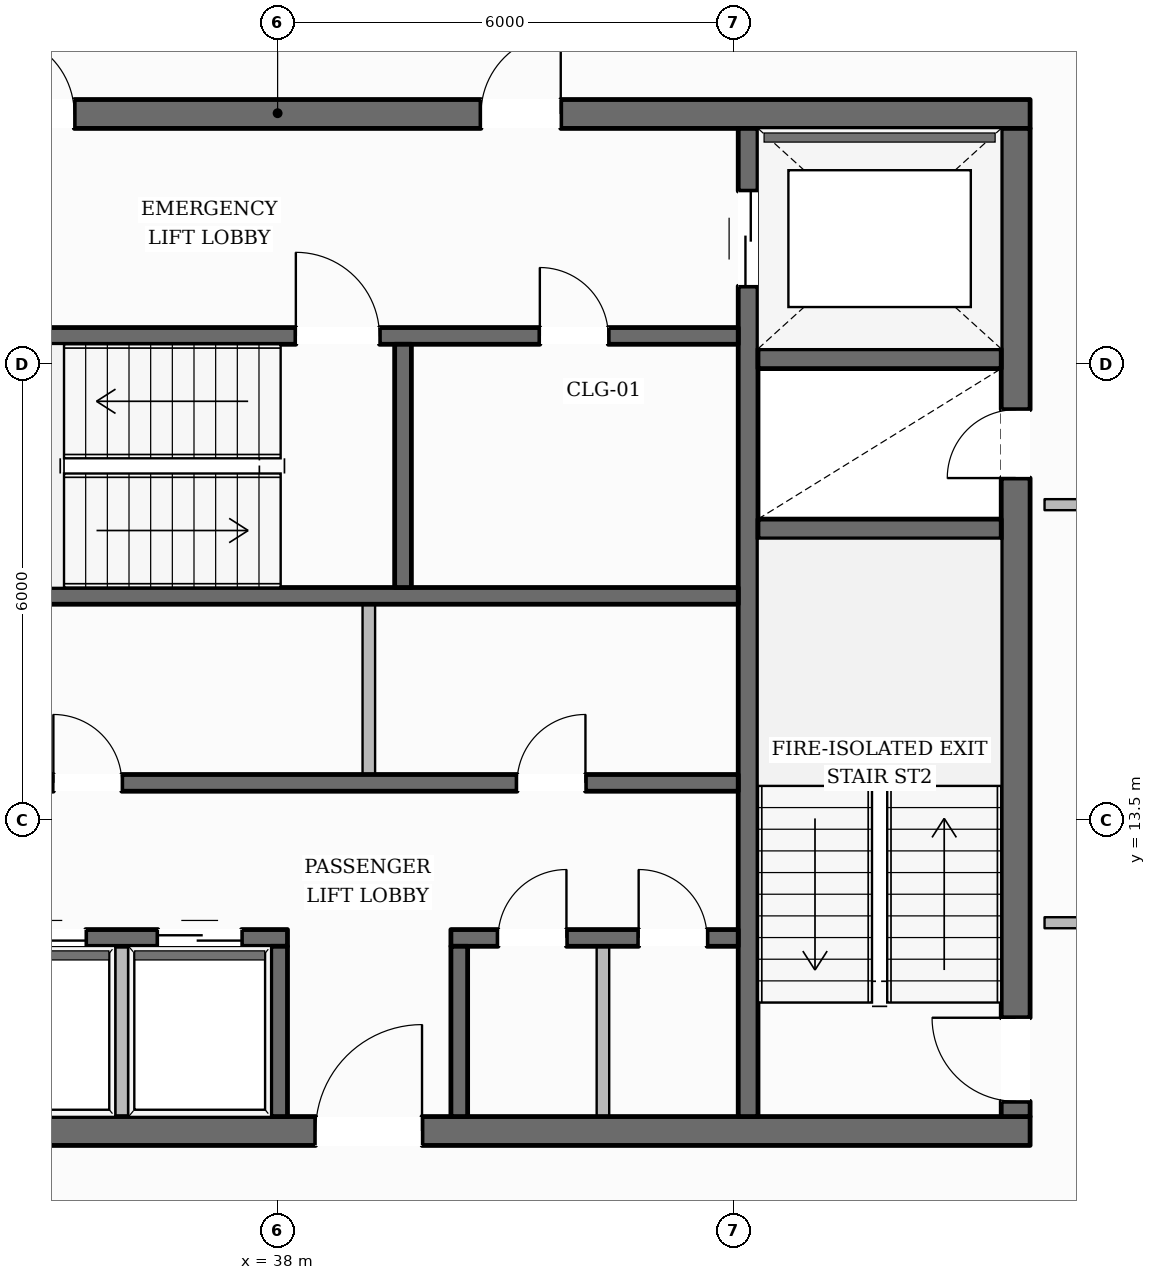
"""IFC4 building model, lengths in metres.
Left out: names, types, materials, properties, quantities, classifications, styles, units other than length and angle.
Written with IfcOpenShell. Run it as: python <this file> out.ifc"""

import sys

from ifc_helpers import new_model, si_unit, direction, frame, frame_2d, origin, place, context, subcontext, project, spatial, rectangle, extrude, element, fill, save


model = new_model("IFC4")
c1 = context("Model", 3, precision=1e-05, world=origin(), true_north=direction((0.0, 1.0)))
c2 = subcontext(c1, "Body", "Model", "MODEL_VIEW")
j1 = project(units=[si_unit("LENGTHUNIT", "METRE"), si_unit("PLANEANGLEUNIT", "RADIAN")], contexts=[c1])
p1 = place(None, origin())
s1 = spatial("IfcSite", under=j1, at=p1, CompositionType="ELEMENT")
p2 = place(p1, origin())
s2 = spatial("IfcBuilding", under=s1, at=p2, CompositionType="ELEMENT")
p3 = place(p2, frame((0.0, 0.0, 258.75)))
s3 = spatial("IfcBuildingStorey", under=s2, at=p3, CompositionType="ELEMENT", Elevation=258.75)
p4 = place(p3, frame((28.1, 9.41, 0.0), z_axis=(0.0, 0.0, 1.0), x_axis=(1.0, 0.0, 0.0)))
e1 = element("IfcWall", 1, at=p4, inside=s3, PredefinedType="SOLIDWALL", context=c2, shape_type="SweptSolid", body=[
    extrude(rectangle(XDim=19.8, YDim=0.38, at=frame_2d((9.9, 0.0))), origin(), (0.0, 0.0, 1.0), 3.61),
])
p5 = place(p4, frame((10.4, 0.0, 0.0)))
e2 = element("IfcOpeningElement", 2, at=p5, cuts=e1, PredefinedType="OPENING", context=c2, shape_type="SweptSolid", body=[
    extrude(rectangle(XDim=1.4, YDim=2.2, at=frame_2d((0.7, 1.1))), frame((0.0, 0.2, 0.0), z_axis=(0.0, -1.0, 0.0), x_axis=(1.0, 0.0, 0.0)), (0.0, 0.0, 1.0), 0.4),
])
p6 = place(p3, frame((28.1, 22.79, 0.0), z_axis=(0.0, 0.0, 1.0), x_axis=(1.0, 0.0, 0.0)))
e3 = element("IfcWall", 3, at=p6, inside=s3, PredefinedType="SOLIDWALL", context=c2, shape_type="SweptSolid", body=[
    extrude(rectangle(XDim=19.8, YDim=0.38, at=frame_2d((9.9, 0.0))), origin(), (0.0, 0.0, 1.0), 3.61),
])
p7 = place(p6, frame((6.175, 0.0, 0.0)))
e4 = element("IfcOpeningElement", 4, at=p7, cuts=e3, PredefinedType="OPENING", context=c2, shape_type="SweptSolid", body=[
    extrude(rectangle(XDim=1.05, YDim=2.15, at=frame_2d((0.525, 1.075))), frame((0.0, 0.2, 0.0), z_axis=(0.0, -1.0, 0.0), x_axis=(1.0, 0.0, 0.0)), (0.0, 0.0, 1.0), 0.4),
])
p8 = place(p6, frame((12.575, 0.0, 0.0)))
e5 = element("IfcOpeningElement", 5, at=p8, cuts=e3, PredefinedType="OPENING", context=c2, shape_type="SweptSolid", body=[
    extrude(rectangle(XDim=1.05, YDim=2.15, at=frame_2d((0.525, 1.075))), frame((0.0, 0.2, 0.0), z_axis=(0.0, -1.0, 0.0), x_axis=(1.0, 0.0, 0.0)), (0.0, 0.0, 1.0), 0.4),
])
p9 = place(p3, frame((47.71, 9.6, 0.0), z_axis=(0.0, 0.0, 1.0), x_axis=(0.0, 1.0, 0.0)))
e6 = element("IfcWall", 6, at=p9, inside=s3, PredefinedType="SOLIDWALL", context=c2, shape_type="SweptSolid", body=[
    extrude(rectangle(XDim=13.0, YDim=0.38, at=frame_2d((6.5, 0.0))), origin(), (0.0, 0.0, 1.0), 3.61),
])
p10 = place(p9, frame((0.2, 0.0, 0.0)))
e7 = element("IfcOpeningElement", 7, at=p10, cuts=e6, PredefinedType="OPENING", context=c2, shape_type="SweptSolid", body=[
    extrude(rectangle(XDim=1.1, YDim=2.15, at=frame_2d((0.55, 1.075))), frame((0.0, 0.2, 0.0), z_axis=(0.0, -1.0, 0.0), x_axis=(1.0, 0.0, 0.0)), (0.0, 0.0, 1.0), 0.4),
])
p11 = place(p9, frame((8.4, 0.0, 0.0)))
e8 = element("IfcOpeningElement", 8, at=p11, cuts=e6, PredefinedType="OPENING", context=c2, shape_type="SweptSolid", body=[
    extrude(rectangle(XDim=0.9, YDim=2.1, at=frame_2d((0.45, 1.05))), frame((0.0, 0.2, 0.0), z_axis=(0.0, -1.0, 0.0), x_axis=(1.0, 0.0, 0.0)), (0.0, 0.0, 1.0), 0.4),
])
p12 = place(p3, frame((44.19, 9.6, 0.0), z_axis=(0.0, 0.0, 1.0), x_axis=(0.0, 1.0, 0.0)))
e9 = element("IfcWall", 9, at=p12, inside=s3, PredefinedType="SHEAR", context=c2, shape_type="SweptSolid", body=[
    extrude(rectangle(XDim=13.0, YDim=0.26, at=frame_2d((6.5, 0.0))), origin(), (0.0, 0.0, 1.0), 3.61),
])
p13 = place(p12, frame((10.925, 0.0, 0.0)))
e10 = element("IfcOpeningElement", 10, at=p13, cuts=e9, PredefinedType="OPENING", context=c2, shape_type="SweptSolid", body=[
    extrude(rectangle(XDim=1.25, YDim=2.25, at=frame_2d((0.625, 1.125))), frame((0.0, 0.14, 0.0), z_axis=(0.0, -1.0, 0.0), x_axis=(1.0, 0.0, 0.0)), (0.0, 0.0, 1.0), 0.28),
])
for number, where, z_axis, x_axis in (
    (11, (44.32, 17.33, 0.0), (0.0, 0.0, 1.0), (1.0, 0.0, 0.0)),
    (12, (44.32, 19.57, 0.0), (0.0, 0.0, 1.0), (1.0, 0.0, 0.0)),
):
    element("IfcWall", number, at=place(p3, frame(where, z_axis=z_axis, x_axis=x_axis)), inside=s3, PredefinedType="SHEAR", context=c2, shape_type="SweptSolid", body=[
        extrude(rectangle(XDim=3.2, YDim=0.26, at=frame_2d((1.6, 0.0))), origin(), (0.0, 0.0, 1.0), 3.61),
    ])
p14 = place(p3, frame((31.94, 19.87, 0.0), z_axis=(0.0, 0.0, 1.0), x_axis=(1.0, 0.0, 0.0)))
e13 = element("IfcWall", 13, at=p14, inside=s3, PredefinedType="SOLIDWALL", context=c2, shape_type="SweptSolid", body=[
    extrude(rectangle(XDim=12.12, YDim=0.22, at=frame_2d((6.06, 0.0))), origin(), (0.0, 0.0, 1.0), 3.61),
])
p15 = place(p14, frame((6.3, 0.0, 0.0)))
e14 = element("IfcOpeningElement", 14, at=p15, cuts=e13, PredefinedType="OPENING", context=c2, shape_type="SweptSolid", body=[
    extrude(rectangle(XDim=1.1, YDim=2.15, at=frame_2d((0.55, 1.075))), frame((0.0, 0.12, 0.0), z_axis=(0.0, -1.0, 0.0), x_axis=(1.0, 0.0, 0.0)), (0.0, 0.0, 1.0), 0.24),
])
p16 = place(p14, frame((9.51, 0.0, 0.0)))
e15 = element("IfcOpeningElement", 15, at=p16, cuts=e13, PredefinedType="OPENING", context=c2, shape_type="SweptSolid", body=[
    extrude(rectangle(XDim=0.9, YDim=2.1, at=frame_2d((0.45, 1.05))), frame((0.0, 0.12, 0.0), z_axis=(0.0, -1.0, 0.0), x_axis=(1.0, 0.0, 0.0)), (0.0, 0.0, 1.0), 0.24),
])
p17 = place(p3, frame((31.94, 16.45, 0.0), z_axis=(0.0, 0.0, 1.0), x_axis=(1.0, 0.0, 0.0)))
e16 = element("IfcWall", 16, at=p17, inside=s3, PredefinedType="SOLIDWALL", context=c2, shape_type="SweptSolid", body=[
    extrude(rectangle(XDim=12.12, YDim=0.22, at=frame_2d((6.06, 0.0))), origin(), (0.0, 0.0, 1.0), 3.61),
])
p18 = place(p3, frame((39.65, 16.56, 0.0), z_axis=(0.0, 0.0, 1.0), x_axis=(0.0, 1.0, 0.0)))
e17 = element("IfcWall", 17, at=p18, inside=s3, PredefinedType="SOLIDWALL", context=c2, shape_type="SweptSolid", body=[
    extrude(rectangle(XDim=3.2, YDim=0.22, at=frame_2d((1.6, 0.0))), origin(), (0.0, 0.0, 1.0), 3.61),
])
p19 = place(p3, frame((31.94, 13.99, 0.0), z_axis=(0.0, 0.0, 1.0), x_axis=(1.0, 0.0, 0.0)))
e18 = element("IfcWall", 18, at=p19, inside=s3, PredefinedType="SOLIDWALL", context=c2, shape_type="SweptSolid", body=[
    extrude(rectangle(XDim=12.12, YDim=0.22, at=frame_2d((6.06, 0.0))), origin(), (0.0, 0.0, 1.0), 3.61),
])
p20 = place(p19, frame((3.11, 0.0, 0.0)))
e19 = element("IfcOpeningElement", 19, at=p20, cuts=e18, PredefinedType="OPENING", context=c2, shape_type="SweptSolid", body=[
    extrude(rectangle(XDim=0.9, YDim=2.1, at=frame_2d((0.45, 1.05))), frame((0.0, 0.12, 0.0), z_axis=(0.0, -1.0, 0.0), x_axis=(1.0, 0.0, 0.0)), (0.0, 0.0, 1.0), 0.24),
])
p21 = place(p19, frame((9.21, 0.0, 0.0)))
e20 = element("IfcOpeningElement", 20, at=p21, cuts=e18, PredefinedType="OPENING", context=c2, shape_type="SweptSolid", body=[
    extrude(rectangle(XDim=0.9, YDim=2.1, at=frame_2d((0.45, 1.05))), frame((0.0, 0.12, 0.0), z_axis=(0.0, -1.0, 0.0), x_axis=(1.0, 0.0, 0.0)), (0.0, 0.0, 1.0), 0.24),
])
p22 = place(p3, frame((31.94, 11.95, 0.0), z_axis=(0.0, 0.0, 1.0), x_axis=(1.0, 0.0, 0.0)))
e21 = element("IfcWall", 21, at=p22, inside=s3, PredefinedType="SOLIDWALL", context=c2, shape_type="SweptSolid", body=[
    extrude(rectangle(XDim=6.19, YDim=0.22, at=frame_2d((3.095, 0.0))), origin(), (0.0, 0.0, 1.0), 3.61),
])
p23 = place(p22, frame((0.385, 0.0, 0.0)))
e22 = element("IfcOpeningElement", 22, at=p23, cuts=e21, PredefinedType="OPENING", context=c2, shape_type="SweptSolid", body=[
    extrude(rectangle(XDim=1.1, YDim=2.2, at=frame_2d((0.55, 1.1))), frame((0.0, 0.12, 0.0), z_axis=(0.0, -1.0, 0.0), x_axis=(1.0, 0.0, 0.0)), (0.0, 0.0, 1.0), 0.24),
])
p24 = place(p22, frame((2.435, 0.0, 0.0)))
e23 = element("IfcOpeningElement", 23, at=p24, cuts=e21, PredefinedType="OPENING", context=c2, shape_type="SweptSolid", body=[
    extrude(rectangle(XDim=1.1, YDim=2.2, at=frame_2d((0.55, 1.1))), frame((0.0, 0.12, 0.0), z_axis=(0.0, -1.0, 0.0), x_axis=(1.0, 0.0, 0.0)), (0.0, 0.0, 1.0), 0.24),
])
p25 = place(p22, frame((4.485, 0.0, 0.0)))
e24 = element("IfcOpeningElement", 24, at=p25, cuts=e21, PredefinedType="OPENING", context=c2, shape_type="SweptSolid", body=[
    extrude(rectangle(XDim=1.1, YDim=2.2, at=frame_2d((0.55, 1.1))), frame((0.0, 0.12, 0.0), z_axis=(0.0, -1.0, 0.0), x_axis=(1.0, 0.0, 0.0)), (0.0, 0.0, 1.0), 0.24),
])
p26 = place(p3, frame((40.28, 11.95, 0.0), z_axis=(0.0, 0.0, 1.0), x_axis=(1.0, 0.0, 0.0)))
e25 = element("IfcWall", 25, at=p26, inside=s3, PredefinedType="SOLIDWALL", context=c2, shape_type="SweptSolid", body=[
    extrude(rectangle(XDim=3.78, YDim=0.22, at=frame_2d((1.89, 0.0))), origin(), (0.0, 0.0, 1.0), 3.61),
])
p27 = place(p26, frame((0.62, 0.0, 0.0)))
e26 = element("IfcOpeningElement", 26, at=p27, cuts=e25, PredefinedType="OPENING", context=c2, shape_type="SweptSolid", body=[
    extrude(rectangle(XDim=0.9, YDim=2.1, at=frame_2d((0.45, 1.05))), frame((0.0, 0.12, 0.0), z_axis=(0.0, -1.0, 0.0), x_axis=(1.0, 0.0, 0.0)), (0.0, 0.0, 1.0), 0.24),
])
p28 = place(p26, frame((2.47, 0.0, 0.0)))
e27 = element("IfcOpeningElement", 27, at=p28, cuts=e25, PredefinedType="OPENING", context=c2, shape_type="SweptSolid", body=[
    extrude(rectangle(XDim=0.9, YDim=2.1, at=frame_2d((0.45, 1.05))), frame((0.0, 0.12, 0.0), z_axis=(0.0, -1.0, 0.0), x_axis=(1.0, 0.0, 0.0)), (0.0, 0.0, 1.0), 0.24),
])
for number, where, z_axis, x_axis in (
    (28, (38.02, 9.6, 0.0), (0.0, 0.0, 1.0), (0.0, 1.0, 0.0)),
    (29, (40.39, 9.6, 0.0), (0.0, 0.0, 1.0), (0.0, 1.0, 0.0)),
):
    element("IfcWall", number, at=place(p3, frame(where, z_axis=z_axis, x_axis=x_axis)), inside=s3, PredefinedType="SOLIDWALL", context=c2, shape_type="SweptSolid", body=[
        extrude(rectangle(XDim=2.24, YDim=0.22, at=frame_2d((1.12, 0.0))), origin(), (0.0, 0.0, 1.0), 3.61),
    ])
p29 = place(p3, frame((41.284, 43.76, 0.0), z_axis=(0.0, 0.0, 1.0), x_axis=(0.50479404613, -0.863239810824, 0.0)))
e30 = element("IfcWall", 30, at=p29, inside=s3, PredefinedType="STANDARD", context=c2, shape_type="SweptSolid", body=[
    extrude(rectangle(XDim=38.372, YDim=0.35, at=frame_2d((19.186, 0.0))), origin(), (0.0, 0.0, 1.0), 3.196),
])
p30 = place(p29, frame((34.102, 0.0, 0.65)))
e31 = element("IfcOpeningElement", 31, at=p30, cuts=e30, PredefinedType="OPENING", context=c2, shape_type="SweptSolid", body=[
    extrude(rectangle(XDim=1.35, YDim=1.75, at=frame_2d((0.675, 0.875))), frame((0.0, 0.185, 0.0), z_axis=(0.0, -1.0, 0.0), x_axis=(1.0, 0.0, 0.0)), (0.0, 0.0, 1.0), 0.37),
])
p31 = place(p29, frame((27.864, 0.0, 0.65)))
e32 = element("IfcOpeningElement", 32, at=p31, cuts=e30, PredefinedType="OPENING", context=c2, shape_type="SweptSolid", body=[
    extrude(rectangle(XDim=1.35, YDim=1.75, at=frame_2d((0.675, 0.875))), frame((0.0, 0.185, 0.0), z_axis=(0.0, -1.0, 0.0), x_axis=(1.0, 0.0, 0.0)), (0.0, 0.0, 1.0), 0.37),
])
p32 = place(p29, frame((15.39, 0.0, 0.65)))
e33 = element("IfcOpeningElement", 33, at=p32, cuts=e30, PredefinedType="OPENING", context=c2, shape_type="SweptSolid", body=[
    extrude(rectangle(XDim=1.35, YDim=1.75, at=frame_2d((0.675, 0.875))), frame((0.0, 0.185, 0.0), z_axis=(0.0, -1.0, 0.0), x_axis=(1.0, 0.0, 0.0)), (0.0, 0.0, 1.0), 0.37),
])
p33 = place(p29, frame((9.153, 0.0, 0.65)))
e34 = element("IfcOpeningElement", 34, at=p33, cuts=e30, PredefinedType="OPENING", context=c2, shape_type="SweptSolid", body=[
    extrude(rectangle(XDim=1.35, YDim=1.75, at=frame_2d((0.675, 0.875))), frame((0.0, 0.185, 0.0), z_axis=(0.0, -1.0, 0.0), x_axis=(1.0, 0.0, 0.0)), (0.0, 0.0, 1.0), 0.37),
])
p34 = place(p29, frame((2.915, 0.0, 0.65)))
e35 = element("IfcOpeningElement", 35, at=p34, cuts=e30, PredefinedType="OPENING", context=c2, shape_type="SweptSolid", body=[
    extrude(rectangle(XDim=1.35, YDim=1.75, at=frame_2d((0.675, 0.875))), frame((0.0, 0.185, 0.0), z_axis=(0.0, -1.0, 0.0), x_axis=(1.0, 0.0, 0.0)), (0.0, 0.0, 1.0), 0.37),
])
p35 = place(p3, frame((35.95, 9.49, 0.0), z_axis=(0.0, 0.0, 1.0), x_axis=(0.0, 1.0, 0.0)))
e36 = element("IfcWall", 36, at=p35, inside=s3, PredefinedType="PARTITIONING", context=c2, shape_type="SweptSolid", body=[
    extrude(rectangle(XDim=2.35, YDim=0.165, at=frame_2d((1.175, 0.0))), origin(), (0.0, 0.0, 1.0), 3.61),
])
p36 = place(p3, frame((39.2, 14.1, 0.0), z_axis=(0.0, 0.0, 1.0), x_axis=(0.0, 1.0, 0.0)))
e37 = element("IfcWall", 37, at=p36, inside=s3, PredefinedType="PARTITIONING", context=c2, shape_type="SweptSolid", body=[
    extrude(rectangle(XDim=2.24, YDim=0.165, at=frame_2d((1.12, 0.0))), origin(), (0.0, 0.0, 1.0), 3.61),
])
p37 = place(p3, frame((42.28, 9.49, 0.0), z_axis=(0.0, 0.0, 1.0), x_axis=(0.0, 1.0, 0.0)))
e38 = element("IfcWall", 38, at=p37, inside=s3, PredefinedType="PARTITIONING", context=c2, shape_type="SweptSolid", body=[
    extrude(rectangle(XDim=2.35, YDim=0.165, at=frame_2d((1.175, 0.0))), origin(), (0.0, 0.0, 1.0), 3.61),
])
for number, where, z_axis, x_axis in (
    (39, (49.91, 17.65, 0.0), (0.0, 0.0, 1.0), (-1.0, 0.0, 0.0)),
    (40, (48.09, 12.15, 0.0), (0.0, 0.0, 1.0), (1.0, 0.0, 0.0)),
):
    element("IfcWall", number, at=place(p3, frame(where, z_axis=z_axis, x_axis=x_axis)), inside=s3, PredefinedType="PARTITIONING", context=c2, shape_type="SweptSolid", body=[
        extrude(rectangle(XDim=1.82, YDim=0.145, at=frame_2d((0.91, 0.0))), origin(), (0.0, 0.0, 1.0), 3.61),
    ])
p38 = place(p10, origin())
e41 = element("IfcDoor", 41, at=p38, inside=s3, OperationType="SINGLE_SWING_RIGHT", PredefinedType="DOOR", context=c2, shape_type="SweptSolid", body=[
    extrude(rectangle(XDim=1.1, YDim=2.15, at=frame_2d((0.55, 1.075))), frame((0.0, 0.025, 0.0), z_axis=(0.0, -1.0, 0.0), x_axis=(1.0, 0.0, 0.0)), (0.0, 0.0, 1.0), 0.05),
])
fill(e7, e41)
p39 = place(p15, origin())
e42 = element("IfcDoor", 42, at=p39, inside=s3, OperationType="SINGLE_SWING_LEFT", PredefinedType="DOOR", context=c2, shape_type="SweptSolid", body=[
    extrude(rectangle(XDim=1.1, YDim=2.15, at=frame_2d((0.55, 1.075))), frame((0.0, 0.025, 0.0), z_axis=(0.0, -1.0, 0.0), x_axis=(1.0, 0.0, 0.0)), (0.0, 0.0, 1.0), 0.05),
])
fill(e14, e42)
p40 = place(p11, origin())
e43 = element("IfcDoor", 43, at=p40, inside=s3, OperationType="SINGLE_SWING_LEFT", PredefinedType="DOOR", context=c2, shape_type="SweptSolid", body=[
    extrude(rectangle(XDim=0.9, YDim=2.1, at=frame_2d((0.45, 1.05))), frame((0.0, 0.025, 0.0), z_axis=(0.0, -1.0, 0.0), x_axis=(1.0, 0.0, 0.0)), (0.0, 0.0, 1.0), 0.05),
])
fill(e8, e43)
p41 = place(p7, origin())
e44 = element("IfcDoor", 44, at=p41, inside=s3, OperationType="SINGLE_SWING_LEFT", PredefinedType="DOOR", context=c2, shape_type="SweptSolid", body=[
    extrude(rectangle(XDim=1.05, YDim=2.15, at=frame_2d((0.525, 1.075))), frame((0.0, 0.025, 0.0), z_axis=(0.0, -1.0, 0.0), x_axis=(1.0, 0.0, 0.0)), (0.0, 0.0, 1.0), 0.05),
])
fill(e4, e44)
p42 = place(p8, origin())
e45 = element("IfcDoor", 45, at=p42, inside=s3, OperationType="SINGLE_SWING_RIGHT", PredefinedType="DOOR", context=c2, shape_type="SweptSolid", body=[
    extrude(rectangle(XDim=1.05, YDim=2.15, at=frame_2d((0.525, 1.075))), frame((0.0, 0.025, 0.0), z_axis=(0.0, -1.0, 0.0), x_axis=(1.0, 0.0, 0.0)), (0.0, 0.0, 1.0), 0.05),
])
fill(e5, e45)
p43 = place(p13, origin())
e46 = element("IfcDoor", 46, at=p43, inside=s3, OperationType="DOUBLE_DOOR_SLIDING", PredefinedType="DOOR", context=c2, shape_type="SweptSolid", body=[
    extrude(rectangle(XDim=1.25, YDim=2.25, at=frame_2d((0.625, 1.125))), frame((0.0, 0.025, 0.0), z_axis=(0.0, -1.0, 0.0), x_axis=(1.0, 0.0, 0.0)), (0.0, 0.0, 1.0), 0.05),
])
fill(e10, e46)
p44 = place(p5, origin())
e47 = element("IfcDoor", 47, at=p44, inside=s3, OperationType="SINGLE_SWING_RIGHT", PredefinedType="DOOR", context=c2, shape_type="SweptSolid", body=[
    extrude(rectangle(XDim=1.4, YDim=2.2, at=frame_2d((0.7, 1.1))), frame((0.0, 0.025, 0.0), z_axis=(0.0, -1.0, 0.0), x_axis=(1.0, 0.0, 0.0)), (0.0, 0.0, 1.0), 0.05),
])
fill(e2, e47)
p45 = place(p24, origin())
e48 = element("IfcDoor", 48, at=p45, inside=s3, OperationType="DOUBLE_DOOR_SLIDING", PredefinedType="DOOR", context=c2, shape_type="SweptSolid", body=[
    extrude(rectangle(XDim=1.1, YDim=2.2, at=frame_2d((0.55, 1.1))), frame((0.0, 0.025, 0.0), z_axis=(0.0, -1.0, 0.0), x_axis=(1.0, 0.0, 0.0)), (0.0, 0.0, 1.0), 0.05),
])
fill(e23, e48)
p46 = place(p25, origin())
e49 = element("IfcDoor", 49, at=p46, inside=s3, OperationType="DOUBLE_DOOR_SLIDING", PredefinedType="DOOR", context=c2, shape_type="SweptSolid", body=[
    extrude(rectangle(XDim=1.1, YDim=2.2, at=frame_2d((0.55, 1.1))), frame((0.0, 0.025, 0.0), z_axis=(0.0, -1.0, 0.0), x_axis=(1.0, 0.0, 0.0)), (0.0, 0.0, 1.0), 0.05),
])
fill(e24, e49)
p47 = place(p20, origin())
e50 = element("IfcDoor", 50, at=p47, inside=s3, OperationType="SINGLE_SWING_LEFT", PredefinedType="DOOR", context=c2, shape_type="SweptSolid", body=[
    extrude(rectangle(XDim=0.9, YDim=2.1, at=frame_2d((0.45, 1.05))), frame((0.0, 0.025, 0.0), z_axis=(0.0, -1.0, 0.0), x_axis=(1.0, 0.0, 0.0)), (0.0, 0.0, 1.0), 0.05),
])
fill(e19, e50)
p48 = place(p21, origin())
e51 = element("IfcDoor", 51, at=p48, inside=s3, OperationType="SINGLE_SWING_RIGHT", PredefinedType="DOOR", context=c2, shape_type="SweptSolid", body=[
    extrude(rectangle(XDim=0.9, YDim=2.1, at=frame_2d((0.45, 1.05))), frame((0.0, 0.025, 0.0), z_axis=(0.0, -1.0, 0.0), x_axis=(1.0, 0.0, 0.0)), (0.0, 0.0, 1.0), 0.05),
])
fill(e20, e51)
p49 = place(p16, origin())
e52 = element("IfcDoor", 52, at=p49, inside=s3, OperationType="SINGLE_SWING_LEFT", PredefinedType="DOOR", context=c2, shape_type="SweptSolid", body=[
    extrude(rectangle(XDim=0.9, YDim=2.1, at=frame_2d((0.45, 1.05))), frame((0.0, 0.025, 0.0), z_axis=(0.0, -1.0, 0.0), x_axis=(1.0, 0.0, 0.0)), (0.0, 0.0, 1.0), 0.05),
])
fill(e15, e52)
p50 = place(p27, origin())
e53 = element("IfcDoor", 53, at=p50, inside=s3, OperationType="SINGLE_SWING_RIGHT", PredefinedType="DOOR", context=c2, shape_type="SweptSolid", body=[
    extrude(rectangle(XDim=0.9, YDim=2.1, at=frame_2d((0.45, 1.05))), frame((0.0, 0.025, 0.0), z_axis=(0.0, -1.0, 0.0), x_axis=(1.0, 0.0, 0.0)), (0.0, 0.0, 1.0), 0.05),
])
fill(e26, e53)
p51 = place(p28, origin())
e54 = element("IfcDoor", 54, at=p51, inside=s3, OperationType="SINGLE_SWING_LEFT", PredefinedType="DOOR", context=c2, shape_type="SweptSolid", body=[
    extrude(rectangle(XDim=0.9, YDim=2.1, at=frame_2d((0.45, 1.05))), frame((0.0, 0.025, 0.0), z_axis=(0.0, -1.0, 0.0), x_axis=(1.0, 0.0, 0.0)), (0.0, 0.0, 1.0), 0.05),
])
fill(e27, e54)
save(model, sys.argv[1])
